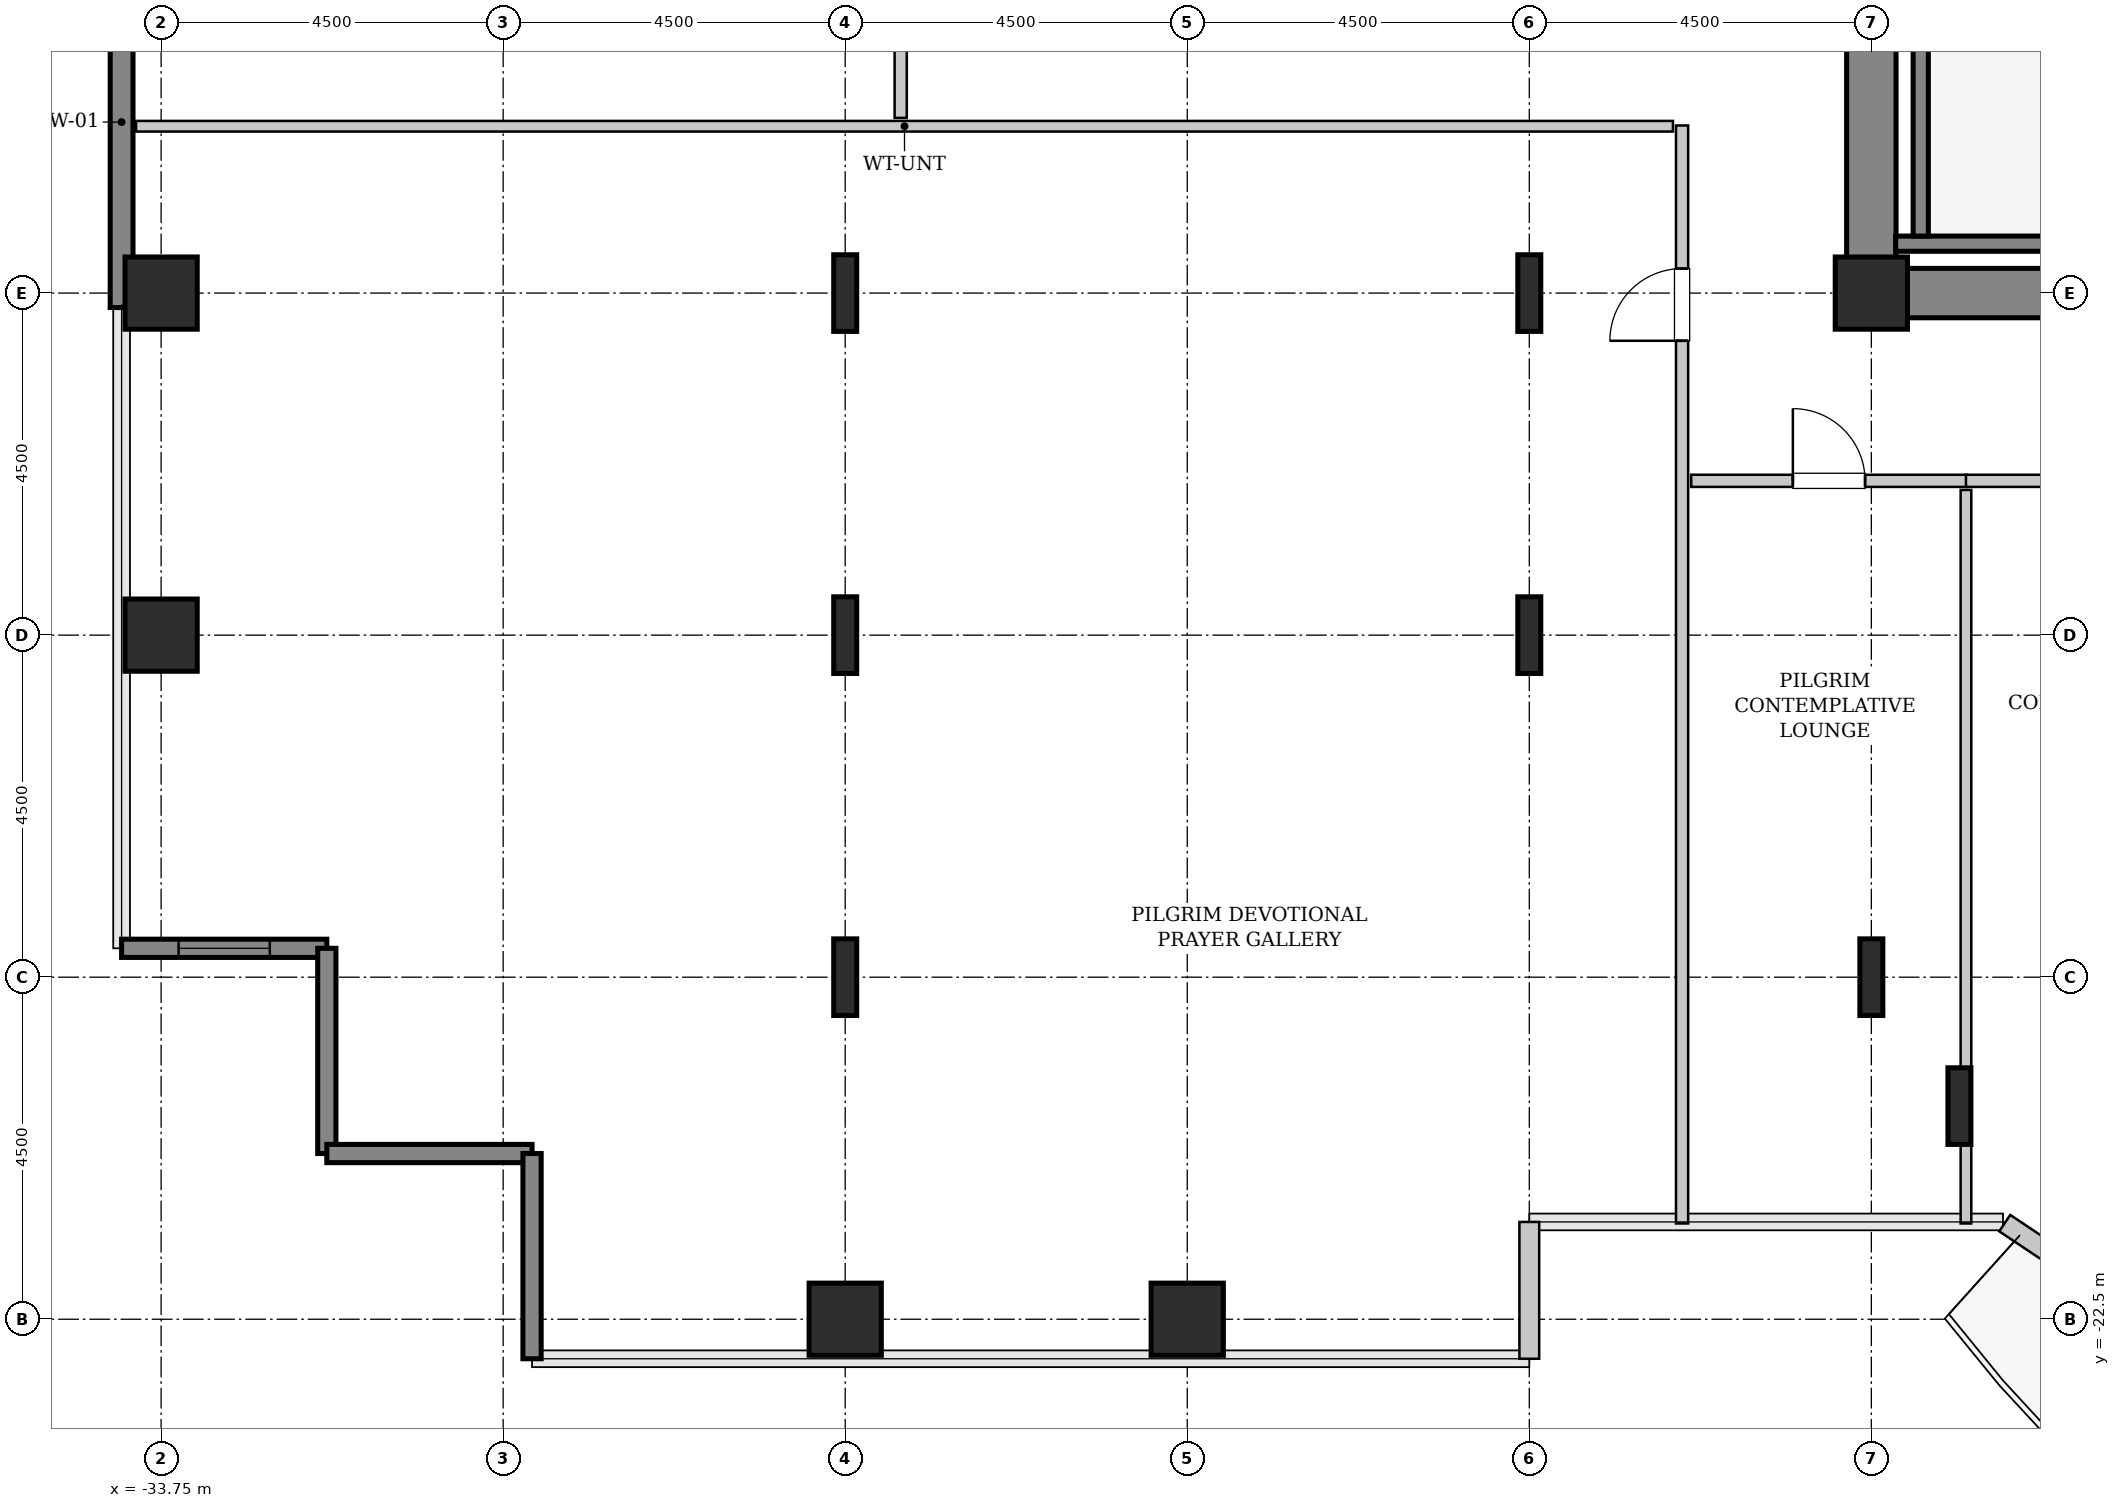
"""IFC4 building model, lengths in metres.
Left out: names, types, materials, properties, quantities, classifications, styles, units other than length and angle.
Written with IfcOpenShell. Run it as: python <this file> out.ifc"""

import sys

from ifc_helpers import new_model, si_unit, direction, frame, frame_2d, origin, origin_2d, place, context, subcontext, project, spatial, rectangle, hollow_rectangle, i_section, extrude, source, transform, mapped, element, fill, save


model = new_model("IFC4")
c1 = context("Model", 3, precision=1e-05, world=origin(), true_north=direction((0.0, 1.0)))
c2 = subcontext(c1, "Body", "Model", "MODEL_VIEW")
j1 = project(units=[si_unit("LENGTHUNIT", "METRE"), si_unit("PLANEANGLEUNIT", "RADIAN")], contexts=[c1])
p1 = place(None, origin())
s1 = spatial("IfcSite", under=j1, at=p1, CompositionType="ELEMENT")
p2 = place(p1, origin())
s2 = spatial("IfcBuilding", under=s1, at=p2, CompositionType="ELEMENT")
p3 = place(p2, frame((0.0, 0.0, 78.6)))
s3 = spatial("IfcBuildingStorey", under=s2, at=p3, CompositionType="ELEMENT", Elevation=78.6)
m1 = source(origin(), c2, "Body", "SweptSolid", [
    extrude(rectangle(XDim=10.025, YDim=0.65, at=frame_2d((5.012, 0.0))), origin(), (0.0, 0.0, 1.0), 3.8),
])
p4 = place(p3, frame((-11.575, -9.0, 0.0), z_axis=(0.0, 0.0, 1.0), x_axis=(1.0, 0.0, 0.0)))
e1 = element("IfcWall", 1, at=p4, inside=s3, PredefinedType="SHEAR", context=c2, shape_type="MappedRepresentation", body=[
    mapped(m1, transform((0.0, 0.0, 0.0), x_axis=(1.0, 0.0, 0.0), y_axis=(0.0, 1.0, 0.0), z_axis=(0.0, 0.0, 1.0), scale=1.0)),
])
m2 = source(origin(), c2, "Body", "SweptSolid", [
    extrude(rectangle(XDim=7.325, YDim=0.65, at=frame_2d((3.663, 0.0))), origin(), (0.0, 0.0, 1.0), 3.8),
])
p5 = place(p3, frame((-11.25, -8.675, 0.0), z_axis=(0.0, 0.0, 1.0), x_axis=(0.0, 1.0, 0.0)))
e2 = element("IfcWall", 2, at=p5, inside=s3, PredefinedType="SHEAR", context=c2, shape_type="MappedRepresentation", body=[
    mapped(m2, transform((0.0, 0.0, 0.0), x_axis=(1.0, 0.0, 0.0), y_axis=(0.0, 1.0, 0.0), z_axis=(0.0, 0.0, 1.0), scale=1.0)),
])
m3 = source(origin(), c2, "Body", "SweptSolid", [
    extrude(hollow_rectangle(XDim=0.95, YDim=0.95, WallThickness=0.045, InnerFilletRadius=0.045, OuterFilletRadius=0.09, at=origin_2d()), origin(), (0.0, 0.0, 1.0), 3.8),
])
for number, where, z_axis, x_axis in (
    (3, (-33.75, -13.5, 0.0), (0.0, 0.0, 1.0), (1.0, 0.0, 0.0)),
    (4, (-33.75, -9.0, 0.0), (0.0, 0.0, 1.0), (1.0, 0.0, 0.0)),
    (5, (-24.75, -22.5, 0.0), (0.0, 0.0, 1.0), (1.0, 0.0, 0.0)),
):
    element("IfcColumn", number, at=place(p3, frame(where, z_axis=z_axis, x_axis=x_axis)), inside=s3, PredefinedType="COLUMN", context=c2, shape_type="MappedRepresentation", body=[
        mapped(m3, transform((0.0, 0.0, 0.0), x_axis=(1.0, 0.0, 0.0), y_axis=(0.0, 1.0, 0.0), z_axis=(0.0, 0.0, 1.0), scale=1.0)),
    ])
m4 = source(origin(), c2, "Body", "SweptSolid", [
    extrude(i_section(OverallWidth=0.302, OverallDepth=1.008, WebThickness=0.021, FlangeThickness=0.04, FilletRadius=0.03, at=origin_2d()), origin(), (0.0, 0.0, 1.0), 3.8),
])
for number, where, z_axis, x_axis in (
    (6, (-24.75, -18.0, 0.0), (0.0, 0.0, 1.0), (1.0, 0.0, 0.0)),
    (7, (-24.75, -13.5, 0.0), (0.0, 0.0, 1.0), (1.0, 0.0, 0.0)),
    (8, (-24.75, -9.0, 0.0), (0.0, 0.0, 1.0), (1.0, 0.0, 0.0)),
):
    element("IfcColumn", number, at=place(p3, frame(where, z_axis=z_axis, x_axis=x_axis)), inside=s3, PredefinedType="COLUMN", context=c2, shape_type="MappedRepresentation", body=[
        mapped(m4, transform((0.0, 0.0, 0.0), x_axis=(1.0, 0.0, 0.0), y_axis=(0.0, 1.0, 0.0), z_axis=(0.0, 0.0, 1.0), scale=1.0)),
    ])
p6 = place(p3, frame((-20.25, -22.5, 0.0), z_axis=(0.0, 0.0, 1.0), x_axis=(1.0, 0.0, 0.0)))
e9 = element("IfcColumn", 9, at=p6, inside=s3, PredefinedType="COLUMN", context=c2, shape_type="MappedRepresentation", body=[
    mapped(m3, transform((0.0, 0.0, 0.0), x_axis=(1.0, 0.0, 0.0), y_axis=(0.0, 1.0, 0.0), z_axis=(0.0, 0.0, 1.0), scale=1.0)),
])
for number, where, z_axis, x_axis in (
    (10, (-15.75, -13.5, 0.0), (0.0, 0.0, 1.0), (1.0, 0.0, 0.0)),
    (11, (-15.75, -9.0, 0.0), (0.0, 0.0, 1.0), (1.0, 0.0, 0.0)),
    (12, (-11.25, -18.0, 0.0), (0.0, 0.0, 1.0), (1.0, 0.0, 0.0)),
):
    element("IfcColumn", number, at=place(p3, frame(where, z_axis=z_axis, x_axis=x_axis)), inside=s3, PredefinedType="COLUMN", context=c2, shape_type="MappedRepresentation", body=[
        mapped(m4, transform((0.0, 0.0, 0.0), x_axis=(1.0, 0.0, 0.0), y_axis=(0.0, 1.0, 0.0), z_axis=(0.0, 0.0, 1.0), scale=1.0)),
    ])
m5 = source(origin(), c2, "Body", "SweptSolid", [
    extrude(hollow_rectangle(XDim=0.95, YDim=0.95, WallThickness=0.045, InnerFilletRadius=0.045, OuterFilletRadius=0.09, at=origin_2d()), origin(), (0.0, 0.0, 1.0), 3.8),
])
p7 = place(p3, frame((-11.25, -9.0, 0.0), z_axis=(0.0, 0.0, 1.0), x_axis=(1.0, 0.0, 0.0)))
e13 = element("IfcColumn", 13, at=p7, inside=s3, PredefinedType="COLUMN", context=c2, shape_type="MappedRepresentation", body=[
    mapped(m5, transform((0.0, 0.0, 0.0), x_axis=(1.0, 0.0, 0.0), y_axis=(0.0, 1.0, 0.0), z_axis=(0.0, 0.0, 1.0), scale=1.0)),
])
p8 = place(p3, frame((-10.091, -19.696, 0.0), z_axis=(0.0, 0.0, 1.0), x_axis=(1.0, 0.0, 0.0)))
e14 = element("IfcColumn", 14, at=p8, inside=s3, PredefinedType="COLUMN", context=c2, shape_type="MappedRepresentation", body=[
    mapped(m4, transform((0.0, 0.0, 0.0), x_axis=(1.0, 0.0, 0.0), y_axis=(0.0, 1.0, 0.0), z_axis=(0.0, 0.0, 1.0), scale=1.0)),
])
m6 = source(origin(), c2, "Body", "SweptSolid", [
    extrude(rectangle(XDim=4.88, YDim=0.3, at=frame_2d((2.44, 0.0))), origin(), (0.0, 0.0, 1.0), 3.55),
])
p9 = place(p3, frame((-34.27, -9.19, 0.0), z_axis=(0.0, 0.0, 1.0), x_axis=(0.0, 1.0, 0.0)))
e15 = element("IfcWall", 15, at=p9, inside=s3, PredefinedType="SHEAR", context=c2, shape_type="MappedRepresentation", body=[
    mapped(m6, transform((0.0, 0.0, 0.0), x_axis=(1.0, 0.0, 0.0), y_axis=(0.0, 1.0, 0.0), z_axis=(0.0, 0.0, 1.0), scale=1.0)),
])
m7 = source(origin(), c2, "Body", "SweptSolid", [
    extrude(rectangle(XDim=2.7, YDim=0.24, at=frame_2d((1.35, 0.0))), origin(), (0.0, 0.0, 1.0), 3.55),
])
p10 = place(p3, frame((-34.27, -17.62, 0.0), z_axis=(0.0, 0.0, 1.0), x_axis=(1.0, 0.0, 0.0)))
e16 = element("IfcWall", 16, at=p10, inside=s3, PredefinedType="SHEAR", context=c2, shape_type="MappedRepresentation", body=[
    mapped(m7, transform((0.0, 0.0, 0.0), x_axis=(1.0, 0.0, 0.0), y_axis=(0.0, 1.0, 0.0), z_axis=(0.0, 0.0, 1.0), scale=1.0)),
])
p11 = place(p10, frame((0.75, 0.0, 0.85)))
e17 = element("IfcOpeningElement", 17, at=p11, cuts=e16, PredefinedType="OPENING", context=c2, shape_type="SweptSolid", body=[
    extrude(rectangle(XDim=1.2, YDim=1.8, at=frame_2d((0.6, 0.9))), frame((0.0, 0.13, 0.0), z_axis=(0.0, -1.0, 0.0), x_axis=(1.0, 0.0, 0.0)), (0.0, 0.0, 1.0), 0.26),
])
for number, where, z_axis, x_axis in (
    (18, (-31.57, -17.62, 0.0), (0.0, 0.0, 1.0), (0.0, -1.0, 0.0)),
    (19, (-31.57, -20.32, 0.0), (0.0, 0.0, 1.0), (1.0, 0.0, 0.0)),
    (20, (-28.87, -20.32, 0.0), (0.0, 0.0, 1.0), (0.0, -1.0, 0.0)),
):
    element("IfcWall", number, at=place(p3, frame(where, z_axis=z_axis, x_axis=x_axis)), inside=s3, PredefinedType="SHEAR", context=c2, shape_type="MappedRepresentation", body=[
        mapped(m7, transform((0.0, 0.0, 0.0), x_axis=(1.0, 0.0, 0.0), y_axis=(0.0, 1.0, 0.0), z_axis=(0.0, 0.0, 1.0), scale=1.0)),
    ])
m8 = source(origin(), c2, "Body", "SweptSolid", [
    extrude(rectangle(XDim=1.8, YDim=0.26, at=frame_2d((0.9, 0.0))), origin(), (0.0, 0.0, 1.0), 3.55),
])
p12 = place(p3, frame((-15.75, -23.02, 0.0), z_axis=(0.0, 0.0, 1.0), x_axis=(0.0, 1.0, 0.0)))
e21 = element("IfcWall", 21, at=p12, inside=s3, PredefinedType="SOLIDWALL", context=c2, shape_type="MappedRepresentation", body=[
    mapped(m8, transform((0.0, 0.0, 0.0), x_axis=(1.0, 0.0, 0.0), y_axis=(0.0, 1.0, 0.0), z_axis=(0.0, 0.0, 1.0), scale=1.0)),
])
m9 = source(origin(), c2, "Body", "SweptSolid", [
    extrude(rectangle(XDim=1.469, YDim=0.26, at=frame_2d((0.734, 0.0))), origin(), (0.0, 0.0, 1.0), 3.55),
])
p13 = place(p3, frame((-9.495, -21.236, 0.0), z_axis=(0.0, 0.0, 1.0), x_axis=(0.831461760506, -0.555581983884, 0.0)))
e22 = element("IfcWall", 22, at=p13, inside=s3, PredefinedType="SOLIDWALL", context=c2, shape_type="MappedRepresentation", body=[
    mapped(m9, transform((0.0, 0.0, 0.0), x_axis=(1.0, 0.0, 0.0), y_axis=(0.0, 1.0, 0.0), z_axis=(0.0, 0.0, 1.0), scale=1.0)),
])
m10 = source(origin(), c2, "Body", "SweptSolid", [
    extrude(rectangle(XDim=3.63, YDim=0.2, at=frame_2d((1.815, 0.0))), origin(), (0.0, 0.0, 1.0), 3.8),
])
p14 = place(p3, frame((-10.93, -8.35, 0.0), z_axis=(0.0, 0.0, 1.0), x_axis=(1.0, 0.0, 0.0)))
e23 = element("IfcWall", 23, at=p14, inside=s3, PredefinedType="SOLIDWALL", context=c2, shape_type="MappedRepresentation", body=[
    mapped(m10, transform((0.0, 0.0, 0.0), x_axis=(1.0, 0.0, 0.0), y_axis=(0.0, 1.0, 0.0), z_axis=(0.0, 0.0, 1.0), scale=1.0)),
])
m11 = source(origin(), c2, "Body", "SweptSolid", [
    extrude(rectangle(XDim=7.1, YDim=0.2, at=frame_2d((3.55, 0.0))), origin(), (0.0, 0.0, 1.0), 3.8),
])
p15 = place(p3, frame((-10.6, -1.15, 0.0), z_axis=(0.0, 0.0, 1.0), x_axis=(0.0, -1.0, 0.0)))
e24 = element("IfcWall", 24, at=p15, inside=s3, PredefinedType="SOLIDWALL", context=c2, shape_type="MappedRepresentation", body=[
    mapped(m11, transform((0.0, 0.0, 0.0), x_axis=(1.0, 0.0, 0.0), y_axis=(0.0, 1.0, 0.0), z_axis=(0.0, 0.0, 1.0), scale=1.0)),
])
m12 = source(origin(), c2, "Body", "SweptSolid", [
    extrude(rectangle(XDim=14.445, YDim=0.16, at=frame_2d((7.223, 0.0))), origin(), (0.0, 0.0, 1.0), 3.535),
])
p16 = place(p3, frame((-13.74, -21.24, 0.0), z_axis=(0.0, 0.0, 1.0), x_axis=(0.0, 1.0, 0.0)))
e25 = element("IfcWall", 25, at=p16, inside=s3, PredefinedType="PARTITIONING", context=c2, shape_type="MappedRepresentation", body=[
    mapped(m12, transform((0.0, 0.0, 0.0), x_axis=(1.0, 0.0, 0.0), y_axis=(0.0, 1.0, 0.0), z_axis=(0.0, 0.0, 1.0), scale=1.0)),
])
p17 = place(p16, frame((11.613, 0.0, 0.0)))
e26 = element("IfcOpeningElement", 26, at=p17, cuts=e25, PredefinedType="OPENING", context=c2, shape_type="SweptSolid", body=[
    extrude(rectangle(XDim=0.95, YDim=2.1, at=frame_2d((0.475, 1.05))), frame((0.0, 0.09, 0.0), z_axis=(0.0, -1.0, 0.0), x_axis=(1.0, 0.0, 0.0)), (0.0, 0.0, 1.0), 0.18),
])
m13 = source(origin(), c2, "Body", "SweptSolid", [
    extrude(rectangle(XDim=20.22, YDim=0.14, at=frame_2d((10.11, 0.0))), origin(), (0.0, 0.0, 1.0), 3.535),
])
p18 = place(p3, frame((-34.08, -6.805, 0.0), z_axis=(0.0, 0.0, 1.0), x_axis=(1.0, 0.0, 0.0)))
e27 = element("IfcWall", 27, at=p18, inside=s3, PredefinedType="PARTITIONING", context=c2, shape_type="MappedRepresentation", body=[
    mapped(m13, transform((0.0, 0.0, 0.0), x_axis=(1.0, 0.0, 0.0), y_axis=(0.0, 1.0, 0.0), z_axis=(0.0, 0.0, 1.0), scale=1.0)),
])
m14 = source(origin(), c2, "Body", "SweptSolid", [
    extrude(rectangle(XDim=14.683, YDim=0.16, at=frame_2d((7.341, 0.0))), origin(), (0.0, 0.0, 1.0), 3.535),
])
p19 = place(p3, frame((-24.02, -6.695, 0.0), z_axis=(0.0, 0.0, 1.0), x_axis=(0.0, 1.0, 0.0)))
e28 = element("IfcWall", 28, at=p19, inside=s3, PredefinedType="PARTITIONING", context=c2, shape_type="MappedRepresentation", body=[
    mapped(m14, transform((0.0, 0.0, 0.0), x_axis=(1.0, 0.0, 0.0), y_axis=(0.0, 1.0, 0.0), z_axis=(0.0, 0.0, 1.0), scale=1.0)),
])
p20 = place(p19, frame((3.97, 0.0, 0.0)))
e29 = element("IfcOpeningElement", 29, at=p20, cuts=e28, PredefinedType="OPENING", context=c2, shape_type="SweptSolid", body=[
    extrude(rectangle(XDim=0.95, YDim=2.1, at=frame_2d((0.475, 1.05))), frame((0.0, 0.09, 0.0), z_axis=(0.0, -1.0, 0.0), x_axis=(1.0, 0.0, 0.0)), (0.0, 0.0, 1.0), 0.18),
])
m15 = source(origin(), c2, "Body", "SweptSolid", [
    extrude(rectangle(XDim=3.625, YDim=0.16, at=frame_2d((1.812, 0.0))), origin(), (0.0, 0.0, 1.0), 3.535),
])
p21 = place(p3, frame((-13.62, -11.47, 0.0), z_axis=(0.0, 0.0, 1.0), x_axis=(1.0, 0.0, 0.0)))
e30 = element("IfcWall", 30, at=p21, inside=s3, PredefinedType="PARTITIONING", context=c2, shape_type="MappedRepresentation", body=[
    mapped(m15, transform((0.0, 0.0, 0.0), x_axis=(1.0, 0.0, 0.0), y_axis=(0.0, 1.0, 0.0), z_axis=(0.0, 0.0, 1.0), scale=1.0)),
])
p22 = place(p21, frame((1.337, 0.0, 0.0)))
e31 = element("IfcOpeningElement", 31, at=p22, cuts=e30, PredefinedType="OPENING", context=c2, shape_type="SweptSolid", body=[
    extrude(rectangle(XDim=0.95, YDim=2.1, at=frame_2d((0.475, 1.05))), frame((0.0, 0.09, 0.0), z_axis=(0.0, -1.0, 0.0), x_axis=(1.0, 0.0, 0.0)), (0.0, 0.0, 1.0), 0.18),
])
m16 = source(origin(), c2, "Body", "SweptSolid", [
    extrude(rectangle(XDim=9.65, YDim=0.14, at=frame_2d((4.825, 0.0))), origin(), (0.0, 0.0, 1.0), 3.535),
])
p23 = place(p3, frame((-10.005, -21.24, 0.0), z_axis=(0.0, 0.0, 1.0), x_axis=(0.0, 1.0, 0.0)))
e32 = element("IfcWall", 32, at=p23, inside=s3, PredefinedType="PARTITIONING", context=c2, shape_type="MappedRepresentation", body=[
    mapped(m16, transform((0.0, 0.0, 0.0), x_axis=(1.0, 0.0, 0.0), y_axis=(0.0, 1.0, 0.0), z_axis=(0.0, 0.0, 1.0), scale=1.0)),
])
m17 = source(origin(), c2, "Body", "SweptSolid", [
    extrude(rectangle(XDim=3.405, YDim=0.16, at=frame_2d((1.702, 0.0))), origin(), (0.0, 0.0, 1.0), 3.535),
])
p24 = place(p3, frame((-10.005, -11.47, 0.0), z_axis=(0.0, 0.0, 1.0), x_axis=(1.0, 0.0, 0.0)))
e33 = element("IfcWall", 33, at=p24, inside=s3, PredefinedType="PARTITIONING", context=c2, shape_type="MappedRepresentation", body=[
    mapped(m17, transform((0.0, 0.0, 0.0), x_axis=(1.0, 0.0, 0.0), y_axis=(0.0, 1.0, 0.0), z_axis=(0.0, 0.0, 1.0), scale=1.0)),
])
p25 = place(p24, frame((1.228, 0.0, 0.0)))
e34 = element("IfcOpeningElement", 34, at=p25, cuts=e33, PredefinedType="OPENING", context=c2, shape_type="SweptSolid", body=[
    extrude(rectangle(XDim=0.95, YDim=2.1, at=frame_2d((0.475, 1.05))), frame((0.0, 0.09, 0.0), z_axis=(0.0, -1.0, 0.0), x_axis=(1.0, 0.0, 0.0)), (0.0, 0.0, 1.0), 0.18),
])
m18 = source(origin(), c2, "Body", "SweptSolid", [
    extrude(rectangle(XDim=1.2, YDim=1.8, at=frame_2d((0.6, 0.9))), frame((0.0, 0.03, 0.0), z_axis=(0.0, -1.0, 0.0), x_axis=(1.0, 0.0, 0.0)), (0.0, 0.0, 1.0), 0.06),
])
p26 = place(p11, origin())
e35 = element("IfcWindow", 35, at=p26, inside=s3, PartitioningType="SINGLE_PANEL", PredefinedType="WINDOW", context=c2, shape_type="MappedRepresentation", body=[
    mapped(m18, transform((0.0, 0.0, 0.0), x_axis=(1.0, 0.0, 0.0), y_axis=(0.0, 1.0, 0.0), z_axis=(0.0, 0.0, 1.0), scale=1.0)),
])
fill(e17, e35)
m19 = source(origin(), c2, "Body", "SweptSolid", [
    extrude(rectangle(XDim=0.95, YDim=2.1, at=frame_2d((0.475, 1.05))), frame((0.0, 0.025, 0.0), z_axis=(0.0, -1.0, 0.0), x_axis=(1.0, 0.0, 0.0)), (0.0, 0.0, 1.0), 0.05),
])
p27 = place(p17, origin())
e36 = element("IfcDoor", 36, at=p27, inside=s3, OperationType="SINGLE_SWING_LEFT", PredefinedType="DOOR", context=c2, shape_type="MappedRepresentation", body=[
    mapped(m19, transform((0.0, 0.0, 0.0), x_axis=(1.0, 0.0, 0.0), y_axis=(0.0, 1.0, 0.0), z_axis=(0.0, 0.0, 1.0), scale=1.0)),
])
fill(e26, e36)
p28 = place(p22, origin())
e37 = element("IfcDoor", 37, at=p28, inside=s3, OperationType="SINGLE_SWING_LEFT", PredefinedType="DOOR", context=c2, shape_type="MappedRepresentation", body=[
    mapped(m19, transform((0.0, 0.0, 0.0), x_axis=(1.0, 0.0, 0.0), y_axis=(0.0, 1.0, 0.0), z_axis=(0.0, 0.0, 1.0), scale=1.0)),
])
fill(e31, e37)
save(model, sys.argv[1])
